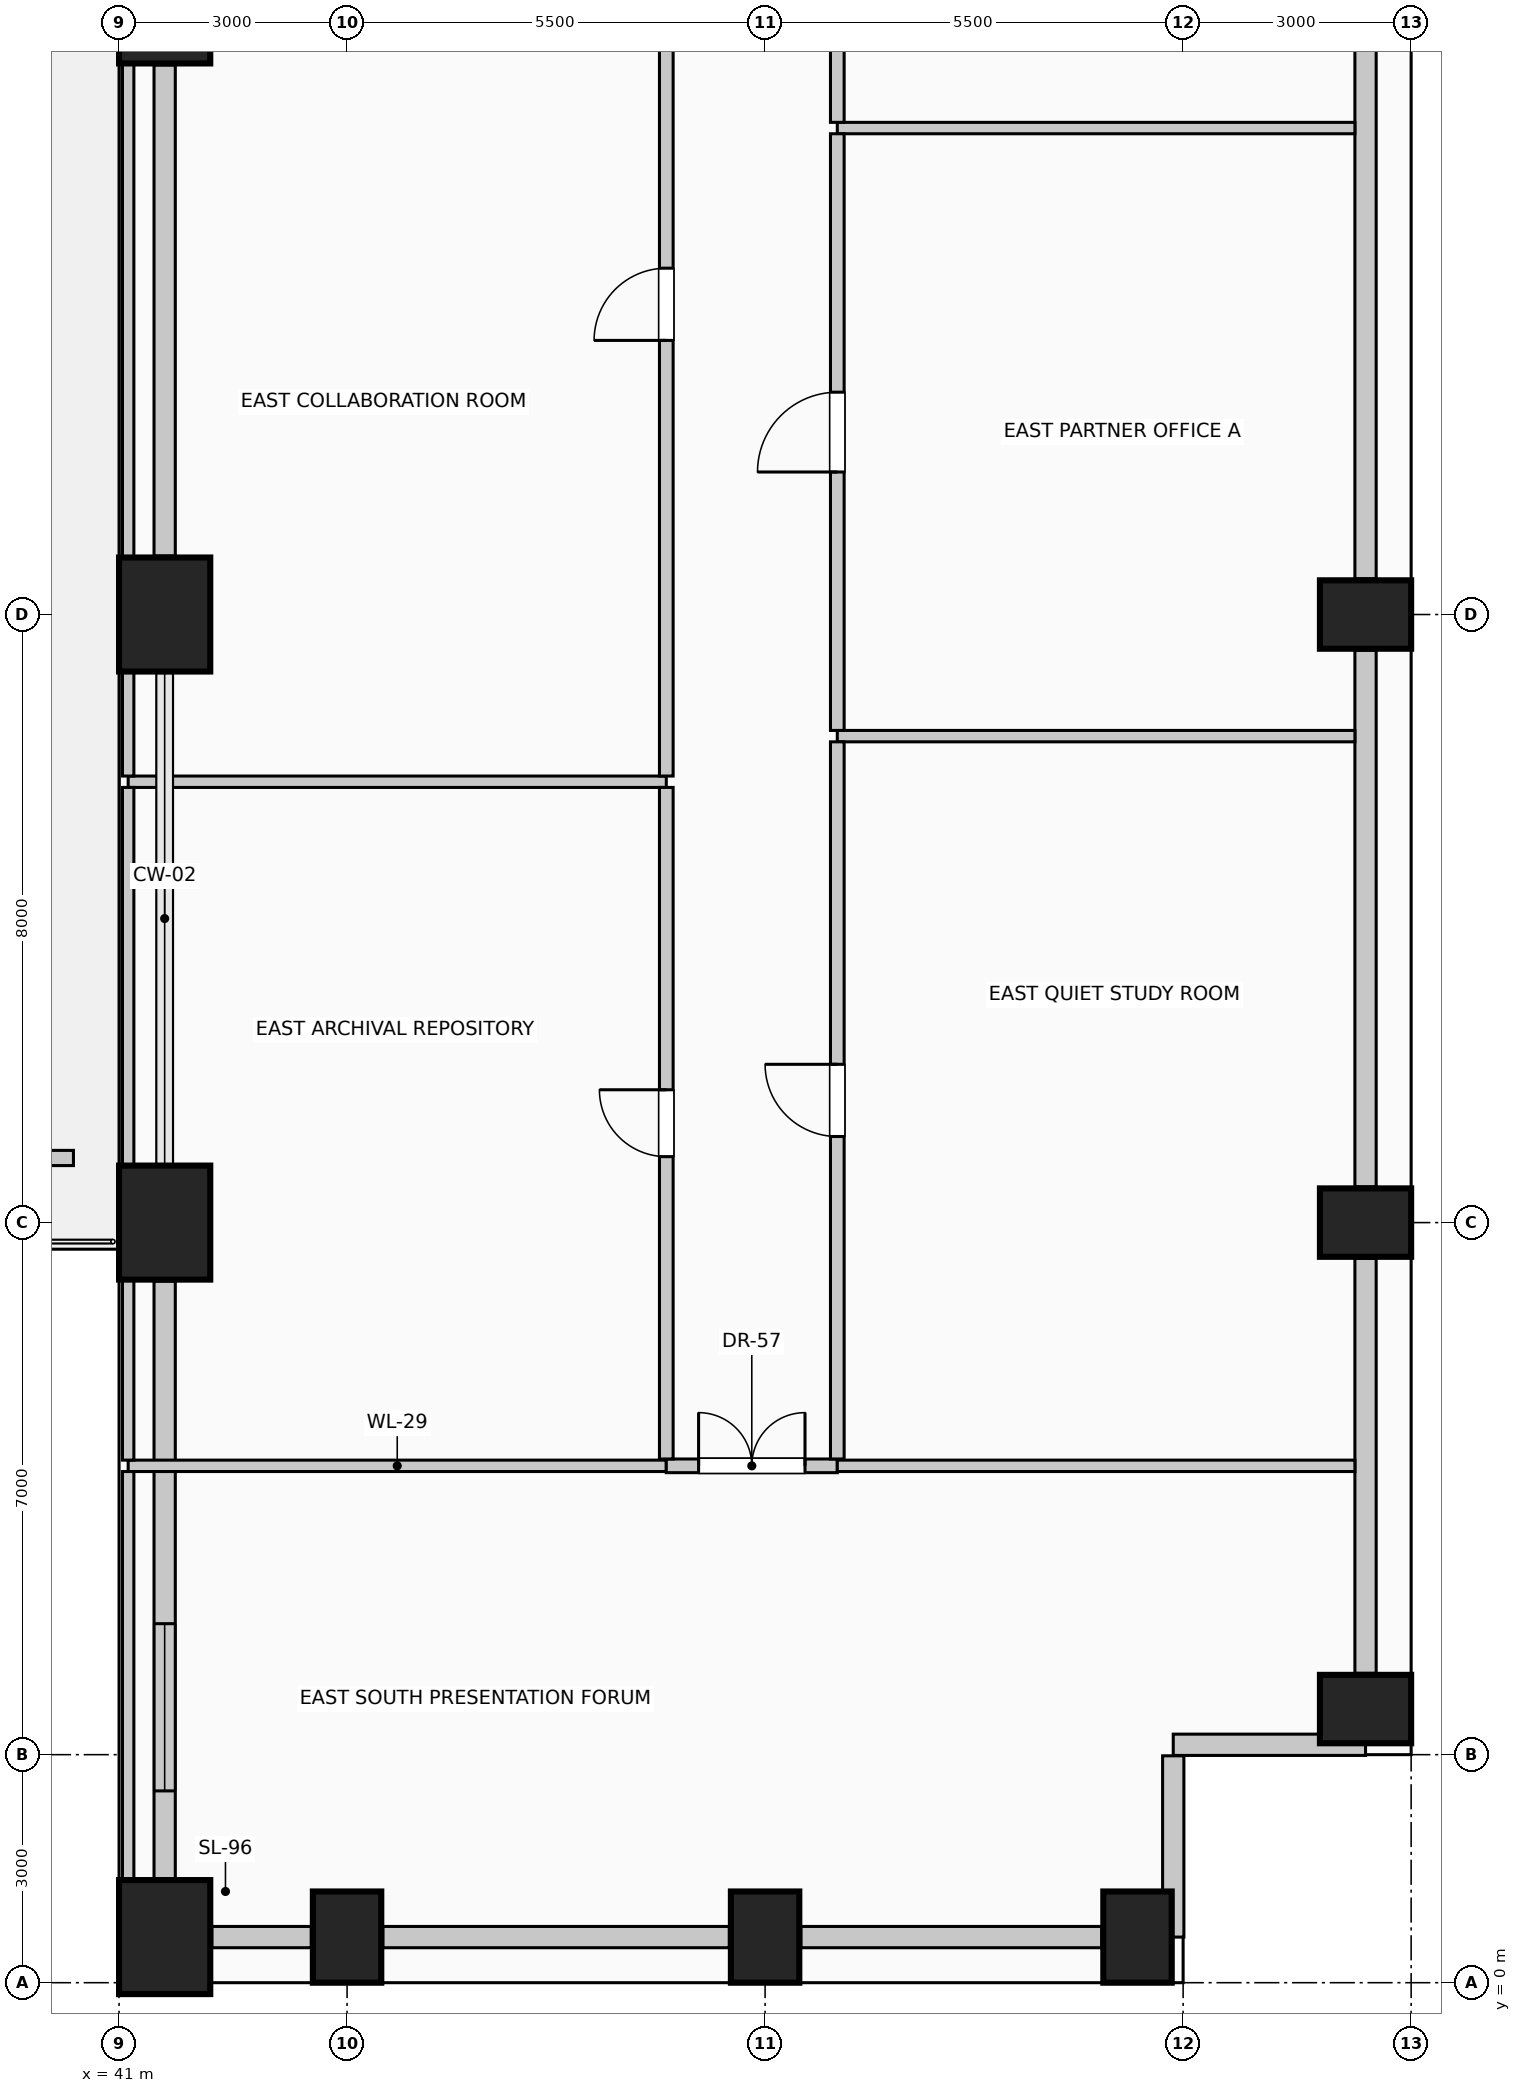
"""IFC4 building model, lengths in metres.
Left out: names, types, materials, properties, quantities, classifications, styles, units other than length and angle.
Written with IfcOpenShell. Run it as: python <this file> out.ifc"""

import sys

from ifc_helpers import new_model, si_unit, direction, frame, frame_2d, origin, origin_2d, place, context, subcontext, project, spatial, rectangle, extrude, element, fill, save


model = new_model("IFC4")
c1 = context("Model", 3, precision=1e-05, world=origin(), true_north=direction((0.0, 1.0)))
c2 = subcontext(c1, "Body", "Model", "MODEL_VIEW")
j1 = project(units=[si_unit("LENGTHUNIT", "METRE"), si_unit("PLANEANGLEUNIT", "RADIAN")], contexts=[c1])
p1 = place(None, origin())
s1 = spatial("IfcSite", under=j1, at=p1, CompositionType="ELEMENT")
p2 = place(p1, origin())
s2 = spatial("IfcBuilding", under=s1, at=p2, CompositionType="ELEMENT")
p3 = place(p2, frame((0.0, 0.0, 30.6)))
s3 = spatial("IfcBuildingStorey", under=s2, at=p3, CompositionType="ELEMENT", Elevation=30.6)
p4 = place(p3, frame((41.6, 0.6, 0.0), z_axis=(0.0, 0.0, 1.0), x_axis=(1.0, 0.0, 0.0)))
e1 = element("IfcColumn", 1, at=p4, inside=s3, PredefinedType="COLUMN", context=c2, shape_type="SweptSolid", body=[
    extrude(rectangle(XDim=1.2, YDim=1.5, at=origin_2d()), origin(), (0.0, 0.0, 1.0), 4.0),
])
for number, where, z_axis, x_axis in (
    (2, (44.0, 0.6, 0.0), (0.0, 0.0, 1.0), (1.0, 0.0, 0.0)),
    (3, (49.5, 0.6, 0.0), (0.0, 0.0, 1.0), (1.0, 0.0, 0.0)),
    (4, (54.4, 0.6, 0.0), (0.0, 0.0, 1.0), (1.0, 0.0, 0.0)),
    (5, (57.4, 3.6, 0.0), (0.0, 0.0, 1.0), (0.0, 1.0, 0.0)),
    (6, (57.4, 10.0, 0.0), (0.0, 0.0, 1.0), (0.0, 1.0, 0.0)),
    (7, (57.4, 18.0, 0.0), (0.0, 0.0, 1.0), (0.0, 1.0, 0.0)),
):
    element("IfcColumn", number, at=place(p3, frame(where, z_axis=z_axis, x_axis=x_axis)), inside=s3, PredefinedType="COLUMN", context=c2, shape_type="SweptSolid", body=[
        extrude(rectangle(XDim=0.9, YDim=1.2, at=origin_2d()), origin(), (0.0, 0.0, 1.0), 4.0),
    ])
for number, where, z_axis, x_axis in (
    (8, (41.6, 10.0, 0.0), (0.0, 0.0, 1.0), (1.0, 0.0, 0.0)),
    (9, (41.6, 18.0, 0.0), (0.0, 0.0, 1.0), (1.0, 0.0, 0.0)),
    (10, (41.6, 26.0, 0.0), (0.0, 0.0, 1.0), (1.0, 0.0, 0.0)),
):
    element("IfcColumn", number, at=place(p3, frame(where, z_axis=z_axis, x_axis=x_axis)), inside=s3, PredefinedType="COLUMN", context=c2, shape_type="SweptSolid", body=[
        extrude(rectangle(XDim=1.2, YDim=1.5, at=origin_2d()), origin(), (0.0, 0.0, 1.0), 4.0),
    ])
p5 = place(p3, frame((43.53, 0.6, 0.0), z_axis=(0.0, 0.0, 1.0), x_axis=(-1.0, 0.0, 0.0)))
e11 = element("IfcWall", 11, at=p5, inside=s3, PredefinedType="SOLIDWALL", context=c2, shape_type="SweptSolid", body=[
    extrude(rectangle(XDim=1.31, YDim=0.28, at=frame_2d((0.655, 0.0))), origin(), (0.0, 0.0, 1.0), 2.85),
])
p6 = place(p3, frame((49.03, 0.6, 0.0), z_axis=(0.0, 0.0, 1.0), x_axis=(-1.0, 0.0, 0.0)))
e12 = element("IfcWall", 12, at=p6, inside=s3, PredefinedType="SOLIDWALL", context=c2, shape_type="SweptSolid", body=[
    extrude(rectangle(XDim=4.56, YDim=0.28, at=frame_2d((2.28, 0.0))), origin(), (0.0, 0.0, 1.0), 2.85),
])
p7 = place(p3, frame((53.93, 0.6, 0.0), z_axis=(0.0, 0.0, 1.0), x_axis=(-1.0, 0.0, 0.0)))
e13 = element("IfcWall", 13, at=p7, inside=s3, PredefinedType="SOLIDWALL", context=c2, shape_type="SweptSolid", body=[
    extrude(rectangle(XDim=3.96, YDim=0.28, at=frame_2d((1.98, 0.0))), origin(), (0.0, 0.0, 1.0), 2.85),
])
p8 = place(p3, frame((57.4, 9.53, 0.0), z_axis=(0.0, 0.0, 1.0), x_axis=(0.0, -1.0, 0.0)))
e14 = element("IfcWall", 14, at=p8, inside=s3, PredefinedType="SOLIDWALL", context=c2, shape_type="SweptSolid", body=[
    extrude(rectangle(XDim=5.46, YDim=0.28, at=frame_2d((2.73, 0.0))), origin(), (0.0, 0.0, 1.0), 2.85),
])
for number, where, z_axis, x_axis in (
    (15, (57.4, 17.53, 0.0), (0.0, 0.0, 1.0), (0.0, -1.0, 0.0)),
    (16, (57.4, 25.53, 0.0), (0.0, 0.0, 1.0), (0.0, -1.0, 0.0)),
):
    element("IfcWall", number, at=place(p3, frame(where, z_axis=z_axis, x_axis=x_axis)), inside=s3, PredefinedType="SOLIDWALL", context=c2, shape_type="SweptSolid", body=[
        extrude(rectangle(XDim=7.06, YDim=0.28, at=frame_2d((3.53, 0.0))), origin(), (0.0, 0.0, 1.0), 2.85),
    ])
p9 = place(p3, frame((57.4, 3.13, 0.0), z_axis=(0.0, 0.0, 1.0), x_axis=(-1.0, 0.0, 0.0)))
e17 = element("IfcWall", 17, at=p9, inside=s3, PredefinedType="SOLIDWALL", context=c2, shape_type="SweptSolid", body=[
    extrude(rectangle(XDim=2.53, YDim=0.28, at=frame_2d((1.265, 0.0))), origin(), (0.0, 0.0, 1.0), 3.7),
])
p10 = place(p3, frame((54.87, 2.985, 0.0), z_axis=(0.0, 0.0, 1.0), x_axis=(0.0, -1.0, 0.0)))
e18 = element("IfcWall", 18, at=p10, inside=s3, PredefinedType="SOLIDWALL", context=c2, shape_type="SweptSolid", body=[
    extrude(rectangle(XDim=2.385, YDim=0.28, at=frame_2d((1.192, 0.0))), origin(), (0.0, 0.0, 1.0), 3.7),
])
p11 = place(p3, frame((41.6, 1.37, 0.0), z_axis=(0.0, 0.0, 1.0), x_axis=(0.0, 1.0, 0.0)))
e19 = element("IfcWall", 19, at=p11, inside=s3, PredefinedType="SOLIDWALL", context=c2, shape_type="SweptSolid", body=[
    extrude(rectangle(XDim=7.86, YDim=0.28, at=frame_2d((3.93, 0.0))), origin(), (0.0, 0.0, 1.0), 3.0),
])
p12 = place(p11, frame((1.153, 0.0, 0.42)))
e20 = element("IfcOpeningElement", 20, at=p12, cuts=e19, PredefinedType="OPENING", context=c2, shape_type="SweptSolid", body=[
    extrude(rectangle(XDim=2.2, YDim=1.95, at=frame_2d((1.1, 0.975))), frame((0.0, 0.15, 0.0), z_axis=(0.0, -1.0, 0.0), x_axis=(1.0, 0.0, 0.0)), (0.0, 0.0, 1.0), 0.3),
])
p13 = place(p3, frame((41.6, 18.77, 0.0), z_axis=(0.0, 0.0, 1.0), x_axis=(0.0, 1.0, 0.0)))
e21 = element("IfcWall", 21, at=p13, inside=s3, PredefinedType="SOLIDWALL", context=c2, shape_type="SweptSolid", body=[
    extrude(rectangle(XDim=6.46, YDim=0.28, at=frame_2d((3.23, 0.0))), origin(), (0.0, 0.0, 1.0), 3.0),
])
p14 = place(p3, frame((17.6, 10.85, 0.0), z_axis=(0.0, 0.0, 1.0), x_axis=(1.0, 0.0, 0.0)))
e22 = element("IfcWall", 22, at=p14, inside=s3, PredefinedType="USERDEFINED", context=c2, shape_type="SweptSolid", body=[
    extrude(rectangle(XDim=22.8, YDim=0.2, at=frame_2d((11.4, 0.0))), origin(), (0.0, 0.0, 1.0), 0.55),
])
p15 = place(p3, frame((41.12, 6.8, 0.0), z_axis=(0.0, 0.0, 1.0), x_axis=(1.0, 0.0, 0.0)))
e23 = element("IfcWall", 23, at=p15, inside=s3, PredefinedType="PARTITIONING", context=c2, shape_type="SweptSolid", body=[
    extrude(rectangle(XDim=7.08, YDim=0.15, at=frame_2d((3.54, 0.0))), origin(), (0.0, 0.0, 1.0), 3.095),
])
p16 = place(p3, frame((48.2, 6.8, 0.0), z_axis=(0.0, 0.0, 1.0), x_axis=(1.0, 0.0, 0.0)))
e24 = element("IfcWall", 24, at=p16, inside=s3, PredefinedType="PARTITIONING", context=c2, shape_type="SweptSolid", body=[
    extrude(rectangle(XDim=2.25, YDim=0.18, at=frame_2d((1.125, 0.0))), origin(), (0.0, 0.0, 1.0), 3.095),
])
p17 = place(p16, frame((0.425, 0.0, 0.0)))
e25 = element("IfcOpeningElement", 25, at=p17, cuts=e24, PredefinedType="OPENING", context=c2, shape_type="SweptSolid", body=[
    extrude(rectangle(XDim=1.4, YDim=2.2, at=frame_2d((0.7, 1.1))), frame((0.0, 0.1, 0.0), z_axis=(0.0, -1.0, 0.0), x_axis=(1.0, 0.0, 0.0)), (0.0, 0.0, 1.0), 0.2),
])
p18 = place(p3, frame((50.45, 6.8, 0.0), z_axis=(0.0, 0.0, 1.0), x_axis=(1.0, 0.0, 0.0)))
e26 = element("IfcWall", 26, at=p18, inside=s3, PredefinedType="PARTITIONING", context=c2, shape_type="SweptSolid", body=[
    extrude(rectangle(XDim=6.81, YDim=0.15, at=frame_2d((3.405, 0.0))), origin(), (0.0, 0.0, 1.0), 3.095),
])
p19 = place(p3, frame((41.12, 15.8, 0.0), z_axis=(0.0, 0.0, 1.0), x_axis=(1.0, 0.0, 0.0)))
e27 = element("IfcWall", 27, at=p19, inside=s3, PredefinedType="PARTITIONING", context=c2, shape_type="SweptSolid", body=[
    extrude(rectangle(XDim=7.08, YDim=0.15, at=frame_2d((3.54, 0.0))), origin(), (0.0, 0.0, 1.0), 3.7),
])
for number, where, z_axis, x_axis in (
    (28, (50.45, 16.4, 0.0), (0.0, 0.0, 1.0), (1.0, 0.0, 0.0)),
    (29, (50.45, 24.4, 0.0), (0.0, 0.0, 1.0), (1.0, 0.0, 0.0)),
):
    element("IfcWall", number, at=place(p3, frame(where, z_axis=z_axis, x_axis=x_axis)), inside=s3, PredefinedType="PARTITIONING", context=c2, shape_type="SweptSolid", body=[
        extrude(rectangle(XDim=6.81, YDim=0.15, at=frame_2d((3.405, 0.0))), origin(), (0.0, 0.0, 1.0), 3.7),
    ])
p20 = place(p3, frame((41.12, 1.35, 0.0), z_axis=(0.0, 0.0, 1.0), x_axis=(0.0, 1.0, 0.0)))
e30 = element("IfcWall", 30, at=p20, inside=s3, PredefinedType="PARTITIONING", context=c2, shape_type="SweptSolid", body=[
    extrude(rectangle(XDim=5.375, YDim=0.15, at=frame_2d((2.688, 0.0))), origin(), (0.0, 0.0, 1.0), 3.7),
])
p21 = place(p3, frame((41.12, 6.875, 0.0), z_axis=(0.0, 0.0, 1.0), x_axis=(0.0, 1.0, 0.0)))
e31 = element("IfcWall", 31, at=p21, inside=s3, PredefinedType="PARTITIONING", context=c2, shape_type="SweptSolid", body=[
    extrude(rectangle(XDim=2.375, YDim=0.15, at=frame_2d((1.188, 0.0))), origin(), (0.0, 0.0, 1.0), 3.7),
])
p22 = place(p3, frame((41.12, 10.75, 0.0), z_axis=(0.0, 0.0, 1.0), x_axis=(0.0, 1.0, 0.0)))
e32 = element("IfcWall", 32, at=p22, inside=s3, PredefinedType="PARTITIONING", context=c2, shape_type="SweptSolid", body=[
    extrude(rectangle(XDim=4.975, YDim=0.15, at=frame_2d((2.488, 0.0))), origin(), (0.0, 0.0, 1.0), 3.7),
])
p23 = place(p3, frame((41.12, 15.875, 0.0), z_axis=(0.0, 0.0, 1.0), x_axis=(0.0, 1.0, 0.0)))
e33 = element("IfcWall", 33, at=p23, inside=s3, PredefinedType="PARTITIONING", context=c2, shape_type="SweptSolid", body=[
    extrude(rectangle(XDim=1.375, YDim=0.15, at=frame_2d((0.688, 0.0))), origin(), (0.0, 0.0, 1.0), 3.7),
])
p24 = place(p3, frame((41.12, 18.75, 0.0), z_axis=(0.0, 0.0, 1.0), x_axis=(0.0, 1.0, 0.0)))
e34 = element("IfcWall", 34, at=p24, inside=s3, PredefinedType="PARTITIONING", context=c2, shape_type="SweptSolid", body=[
    extrude(rectangle(XDim=6.5, YDim=0.15, at=frame_2d((3.25, 0.0))), origin(), (0.0, 0.0, 1.0), 3.7),
])
p25 = place(p3, frame((48.2, 6.89, 0.0), z_axis=(0.0, 0.0, 1.0), x_axis=(0.0, 1.0, 0.0)))
e35 = element("IfcWall", 35, at=p25, inside=s3, PredefinedType="PARTITIONING", context=c2, shape_type="SweptSolid", body=[
    extrude(rectangle(XDim=8.835, YDim=0.18, at=frame_2d((4.417, 0.0))), origin(), (0.0, 0.0, 1.0), 3.7),
])
p26 = place(p25, frame((3.978, 0.0, 0.0)))
e36 = element("IfcOpeningElement", 36, at=p26, cuts=e35, PredefinedType="OPENING", context=c2, shape_type="SweptSolid", body=[
    extrude(rectangle(XDim=0.88, YDim=2.1, at=frame_2d((0.44, 1.05))), frame((0.0, 0.1, 0.0), z_axis=(0.0, -1.0, 0.0), x_axis=(1.0, 0.0, 0.0)), (0.0, 0.0, 1.0), 0.2),
])
p27 = place(p3, frame((48.2, 15.875, 0.0), z_axis=(0.0, 0.0, 1.0), x_axis=(0.0, 1.0, 0.0)))
e37 = element("IfcWall", 37, at=p27, inside=s3, PredefinedType="PARTITIONING", context=c2, shape_type="SweptSolid", body=[
    extrude(rectangle(XDim=12.413, YDim=0.18, at=frame_2d((6.206, 0.0))), origin(), (0.0, 0.0, 1.0), 3.7),
])
p28 = place(p27, frame((5.731, 0.0, 0.0)))
e38 = element("IfcOpeningElement", 38, at=p28, cuts=e37, PredefinedType="OPENING", context=c2, shape_type="SweptSolid", body=[
    extrude(rectangle(XDim=0.95, YDim=2.15, at=frame_2d((0.475, 1.075))), frame((0.0, 0.1, 0.0), z_axis=(0.0, -1.0, 0.0), x_axis=(1.0, 0.0, 0.0)), (0.0, 0.0, 1.0), 0.2),
])
p29 = place(p3, frame((50.45, 6.89, 0.0), z_axis=(0.0, 0.0, 1.0), x_axis=(0.0, 1.0, 0.0)))
e39 = element("IfcWall", 39, at=p29, inside=s3, PredefinedType="PARTITIONING", context=c2, shape_type="SweptSolid", body=[
    extrude(rectangle(XDim=9.435, YDim=0.18, at=frame_2d((4.718, 0.0))), origin(), (0.0, 0.0, 1.0), 3.7),
])
p30 = place(p29, frame((4.242, 0.0, 0.0)))
e40 = element("IfcOpeningElement", 40, at=p30, cuts=e39, PredefinedType="OPENING", context=c2, shape_type="SweptSolid", body=[
    extrude(rectangle(XDim=0.95, YDim=2.15, at=frame_2d((0.475, 1.075))), frame((0.0, 0.1, 0.0), z_axis=(0.0, -1.0, 0.0), x_axis=(1.0, 0.0, 0.0)), (0.0, 0.0, 1.0), 0.2),
])
p31 = place(p3, frame((50.45, 16.475, 0.0), z_axis=(0.0, 0.0, 1.0), x_axis=(0.0, 1.0, 0.0)))
e41 = element("IfcWall", 41, at=p31, inside=s3, PredefinedType="PARTITIONING", context=c2, shape_type="SweptSolid", body=[
    extrude(rectangle(XDim=7.85, YDim=0.18, at=frame_2d((3.925, 0.0))), origin(), (0.0, 0.0, 1.0), 3.7),
])
p32 = place(p31, frame((3.4, 0.0, 0.0)))
e42 = element("IfcOpeningElement", 42, at=p32, cuts=e41, PredefinedType="OPENING", context=c2, shape_type="SweptSolid", body=[
    extrude(rectangle(XDim=1.05, YDim=2.15, at=frame_2d((0.525, 1.075))), frame((0.0, 0.1, 0.0), z_axis=(0.0, -1.0, 0.0), x_axis=(1.0, 0.0, 0.0)), (0.0, 0.0, 1.0), 0.2),
])
p33 = place(p3, frame((50.45, 24.475, 0.0), z_axis=(0.0, 0.0, 1.0), x_axis=(0.0, 1.0, 0.0)))
e43 = element("IfcWall", 43, at=p33, inside=s3, PredefinedType="PARTITIONING", context=c2, shape_type="SweptSolid", body=[
    extrude(rectangle(XDim=7.8, YDim=0.18, at=frame_2d((3.9, 0.0))), origin(), (0.0, 0.0, 1.0), 3.7),
])
p34 = place(p12, origin())
e44 = element("IfcWindow", 44, at=p34, inside=s3, PartitioningType="SINGLE_PANEL", PredefinedType="WINDOW", context=c2, shape_type="SweptSolid", body=[
    extrude(rectangle(XDim=2.2, YDim=1.95, at=frame_2d((1.1, 0.975))), frame((0.0, 0.03, 0.0), z_axis=(0.0, -1.0, 0.0), x_axis=(1.0, 0.0, 0.0)), (0.0, 0.0, 1.0), 0.06),
])
fill(e20, e44)
p35 = place(p17, origin())
e45 = element("IfcDoor", 45, at=p35, inside=s3, OperationType="DOUBLE_DOOR_SINGLE_SWING", PredefinedType="DOOR", context=c2, shape_type="SweptSolid", body=[
    extrude(rectangle(XDim=1.4, YDim=2.2, at=frame_2d((0.7, 1.1))), frame((0.0, 0.025, 0.0), z_axis=(0.0, -1.0, 0.0), x_axis=(1.0, 0.0, 0.0)), (0.0, 0.0, 1.0), 0.05),
])
fill(e25, e45)
p36 = place(p26, origin())
e46 = element("IfcDoor", 46, at=p36, inside=s3, OperationType="SINGLE_SWING_RIGHT", PredefinedType="DOOR", context=c2, shape_type="SweptSolid", body=[
    extrude(rectangle(XDim=0.88, YDim=2.1, at=frame_2d((0.44, 1.05))), frame((0.0, 0.025, 0.0), z_axis=(0.0, -1.0, 0.0), x_axis=(1.0, 0.0, 0.0)), (0.0, 0.0, 1.0), 0.05),
])
fill(e36, e46)
p37 = place(p28, origin())
e47 = element("IfcDoor", 47, at=p37, inside=s3, OperationType="SINGLE_SWING_LEFT", PredefinedType="DOOR", context=c2, shape_type="SweptSolid", body=[
    extrude(rectangle(XDim=0.95, YDim=2.15, at=frame_2d((0.475, 1.075))), frame((0.0, 0.025, 0.0), z_axis=(0.0, -1.0, 0.0), x_axis=(1.0, 0.0, 0.0)), (0.0, 0.0, 1.0), 0.05),
])
fill(e38, e47)
p38 = place(p30, origin())
e48 = element("IfcDoor", 48, at=p38, inside=s3, OperationType="SINGLE_SWING_RIGHT", PredefinedType="DOOR", context=c2, shape_type="SweptSolid", body=[
    extrude(rectangle(XDim=0.95, YDim=2.15, at=frame_2d((0.475, 1.075))), frame((0.0, 0.025, 0.0), z_axis=(0.0, -1.0, 0.0), x_axis=(1.0, 0.0, 0.0)), (0.0, 0.0, 1.0), 0.05),
])
fill(e40, e48)
p39 = place(p32, origin())
e49 = element("IfcDoor", 49, at=p39, inside=s3, OperationType="SINGLE_SWING_LEFT", PredefinedType="DOOR", context=c2, shape_type="SweptSolid", body=[
    extrude(rectangle(XDim=1.05, YDim=2.15, at=frame_2d((0.525, 1.075))), frame((0.0, 0.025, 0.0), z_axis=(0.0, -1.0, 0.0), x_axis=(1.0, 0.0, 0.0)), (0.0, 0.0, 1.0), 0.05),
])
fill(e42, e49)
save(model, sys.argv[1])
